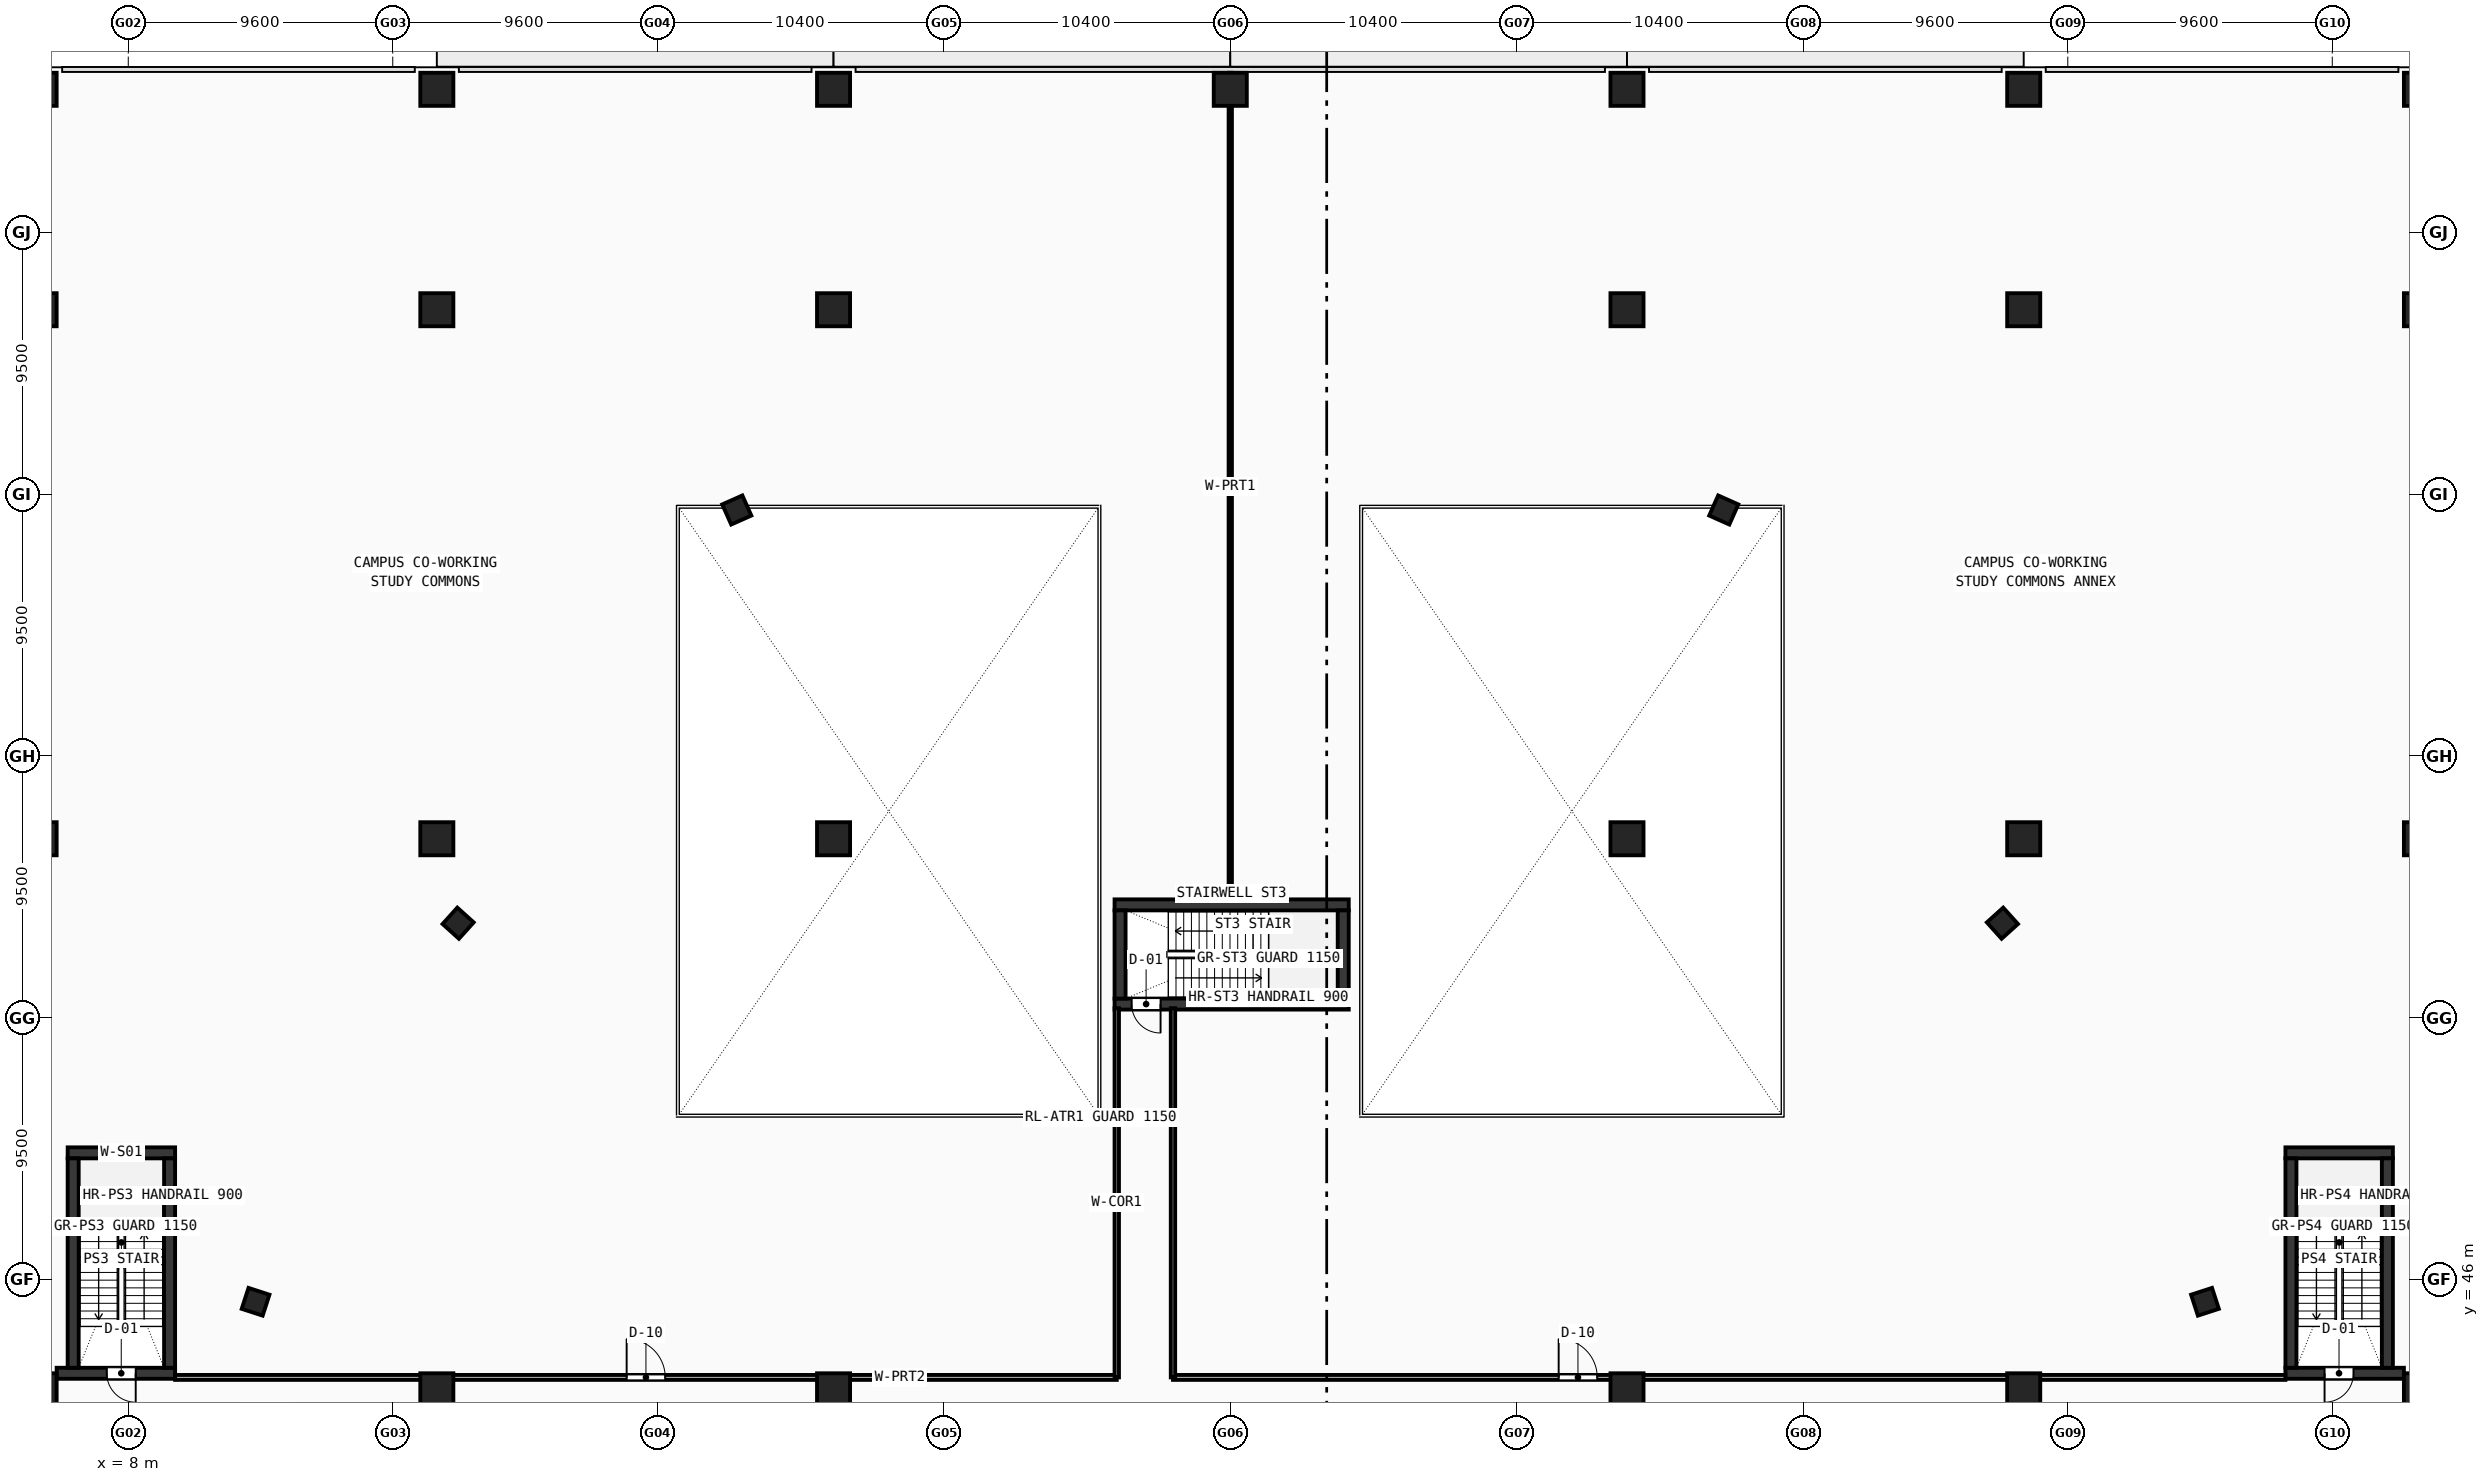
"""IFC4 building model, lengths in metres.
Left out: names, types, materials, properties, quantities, classifications, styles, units other than length and angle.
Written with IfcOpenShell. Run it as: python <this file> out.ifc"""

import sys

from ifc_helpers import new_model, si_unit, direction, frame, frame_2d, origin, origin_with_axes, origin_2d, place, context, subcontext, project, spatial, rectangle, hollow_rectangle, extrude, source, transform, mapped, element, fill, save


model = new_model("IFC4")
c1 = context("Model", 3, precision=1e-05, world=origin(), true_north=direction((0.0, 1.0)))
c2 = subcontext(c1, "Body", "Model", "MODEL_VIEW")
j1 = project(units=[si_unit("LENGTHUNIT", "METRE"), si_unit("PLANEANGLEUNIT", "RADIAN")], contexts=[c1])
p1 = place(None, origin())
s1 = spatial("IfcSite", under=j1, at=p1, CompositionType="ELEMENT")
p2 = place(p1, origin())
s2 = spatial("IfcBuilding", under=s1, at=p2, CompositionType="ELEMENT")
p3 = place(p2, frame((0.0, 0.0, 4.8)))
s3 = spatial("IfcBuildingStorey", under=s2, at=p3, CompositionType="ELEMENT", Elevation=4.8)
p4 = place(p3, frame((5.8, 50.6, 0.0), z_axis=(0.0, 0.0, 1.0), x_axis=(1.0, 0.0, 0.0)))
e1 = element("IfcWall", 1, at=p4, inside=s3, PredefinedType="SHEAR", context=c2, shape_type="SweptSolid", body=[
    extrude(rectangle(XDim=3.9, YDim=0.4, at=frame_2d((1.95, 0.0))), origin(), (0.0, 0.0, 1.0), 4.52),
])
p5 = place(p3, frame((5.4, 42.6, 0.0), z_axis=(0.0, 0.0, 1.0), x_axis=(1.0, 0.0, 0.0)))
e2 = element("IfcWall", 2, at=p5, inside=s3, PredefinedType="SHEAR", context=c2, shape_type="SweptSolid", body=[
    extrude(rectangle(XDim=4.3, YDim=0.4, at=frame_2d((2.15, 0.0))), origin(), (0.0, 0.0, 1.0), 4.52),
])
p6 = place(p5, frame((1.82, 0.0, 0.0)))
e3 = element("IfcOpeningElement", 3, at=p6, cuts=e2, PredefinedType="OPENING", context=c2, shape_type="SweptSolid", body=[
    extrude(rectangle(XDim=1.05, YDim=2.1, at=frame_2d((0.525, 1.05))), frame((0.0, 0.21, 0.0), z_axis=(0.0, -1.0, 0.0), x_axis=(1.0, 0.0, 0.0)), (0.0, 0.0, 1.0), 0.42),
])
for number, where, z_axis, x_axis in (
    (4, (6.0, 42.8, 0.0), (0.0, 0.0, 1.0), (0.0, 1.0, 0.0)),
    (5, (9.5, 42.8, 0.0), (0.0, 0.0, 1.0), (0.0, 1.0, 0.0)),
):
    element("IfcWall", number, at=place(p3, frame(where, z_axis=z_axis, x_axis=x_axis)), inside=s3, PredefinedType="SHEAR", context=c2, shape_type="SweptSolid", body=[
        extrude(rectangle(XDim=7.6, YDim=0.4, at=frame_2d((3.8, 0.0))), origin(), (0.0, 0.0, 1.0), 4.52),
    ])
p7 = place(p3, frame((86.3, 50.6, 0.0), z_axis=(0.0, 0.0, 1.0), x_axis=(1.0, 0.0, 0.0)))
e6 = element("IfcWall", 6, at=p7, inside=s3, PredefinedType="SHEAR", context=c2, shape_type="SweptSolid", body=[
    extrude(rectangle(XDim=3.9, YDim=0.4, at=frame_2d((1.95, 0.0))), origin(), (0.0, 0.0, 1.0), 4.52),
])
p8 = place(p3, frame((86.3, 42.6, 0.0), z_axis=(0.0, 0.0, 1.0), x_axis=(1.0, 0.0, 0.0)))
e7 = element("IfcWall", 7, at=p8, inside=s3, PredefinedType="SHEAR", context=c2, shape_type="SweptSolid", body=[
    extrude(rectangle(XDim=4.3, YDim=0.4, at=frame_2d((2.15, 0.0))), origin(), (0.0, 0.0, 1.0), 4.52),
])
p9 = place(p8, frame((1.42, 0.0, 0.0)))
e8 = element("IfcOpeningElement", 8, at=p9, cuts=e7, PredefinedType="OPENING", context=c2, shape_type="SweptSolid", body=[
    extrude(rectangle(XDim=1.05, YDim=2.1, at=frame_2d((0.525, 1.05))), frame((0.0, 0.21, 0.0), z_axis=(0.0, -1.0, 0.0), x_axis=(1.0, 0.0, 0.0)), (0.0, 0.0, 1.0), 0.42),
])
for number, where, z_axis, x_axis in (
    (9, (86.5, 42.8, 0.0), (0.0, 0.0, 1.0), (0.0, 1.0, 0.0)),
    (10, (90.0, 42.8, 0.0), (0.0, 0.0, 1.0), (0.0, 1.0, 0.0)),
):
    element("IfcWall", number, at=place(p3, frame(where, z_axis=z_axis, x_axis=x_axis)), inside=s3, PredefinedType="SHEAR", context=c2, shape_type="SweptSolid", body=[
        extrude(rectangle(XDim=7.6, YDim=0.4, at=frame_2d((3.8, 0.0))), origin(), (0.0, 0.0, 1.0), 4.52),
    ])
p10 = place(p3, frame((43.8, 59.6, 0.0), z_axis=(0.0, 0.0, 1.0), x_axis=(1.0, 0.0, 0.0)))
e11 = element("IfcWall", 11, at=p10, inside=s3, PredefinedType="SHEAR", context=c2, shape_type="SweptSolid", body=[
    extrude(rectangle(XDim=8.5, YDim=0.4, at=frame_2d((4.25, 0.0))), origin(), (0.0, 0.0, 1.0), 4.52),
])
p11 = place(p3, frame((43.8, 56.0, 0.0), z_axis=(0.0, 0.0, 1.0), x_axis=(1.0, 0.0, 0.0)))
e12 = element("IfcWall", 12, at=p11, inside=s3, PredefinedType="SHEAR", context=c2, shape_type="SweptSolid", body=[
    extrude(rectangle(XDim=8.5, YDim=0.4, at=frame_2d((4.25, 0.0))), origin(), (0.0, 0.0, 1.0), 4.52),
])
p12 = place(p11, frame((0.62, 0.0, 0.0)))
e13 = element("IfcOpeningElement", 13, at=p12, cuts=e12, PredefinedType="OPENING", context=c2, shape_type="SweptSolid", body=[
    extrude(rectangle(XDim=1.05, YDim=2.1, at=frame_2d((0.525, 1.05))), frame((0.0, 0.21, 0.0), z_axis=(0.0, -1.0, 0.0), x_axis=(1.0, 0.0, 0.0)), (0.0, 0.0, 1.0), 0.42),
])
for number, where, z_axis, x_axis in (
    (14, (44.0, 56.2, 0.0), (0.0, 0.0, 1.0), (0.0, 1.0, 0.0)),
    (15, (52.1, 56.2, 0.0), (0.0, 0.0, 1.0), (0.0, 1.0, 0.0)),
):
    element("IfcWall", number, at=place(p3, frame(where, z_axis=z_axis, x_axis=x_axis)), inside=s3, PredefinedType="SHEAR", context=c2, shape_type="SweptSolid", body=[
        extrude(rectangle(XDim=3.2, YDim=0.4, at=frame_2d((1.6, 0.0))), origin(), (0.0, 0.0, 1.0), 4.52),
    ])
m1 = source(origin(), c2, "Body", "SweptSolid", [
    extrude(hollow_rectangle(XDim=1.2, YDim=1.2, WallThickness=0.05, at=origin_2d()), origin(), (0.0, 0.0, 1.0), 4.8),
])
for number, where, z_axis, x_axis in (
    (16, (4.8, 42.0, -0.28), (0.0, 0.0, 1.0), (1.0, 0.0, 0.0)),
    (17, (4.8, 62.0, -0.28), (0.0, 0.0, 1.0), (1.0, 0.0, 0.0)),
    (18, (4.8, 81.2, -0.28), (0.0, 0.0, 1.0), (1.0, 0.0, 0.0)),
    (19, (19.2, 42.0, -0.28), (0.0, 0.0, 1.0), (1.0, 0.0, 0.0)),
    (20, (19.2, 62.0, -0.28), (0.0, 0.0, 1.0), (1.0, 0.0, 0.0)),
    (21, (19.2, 81.2, -0.28), (0.0, 0.0, 1.0), (1.0, 0.0, 0.0)),
    (22, (33.6, 42.0, -0.28), (0.0, 0.0, 1.0), (1.0, 0.0, 0.0)),
    (23, (33.6, 62.0, -0.28), (0.0, 0.0, 1.0), (1.0, 0.0, 0.0)),
    (24, (33.6, 81.2, -0.28), (0.0, 0.0, 1.0), (1.0, 0.0, 0.0)),
    (25, (62.4, 42.0, -0.28), (0.0, 0.0, 1.0), (1.0, 0.0, 0.0)),
    (26, (62.4, 62.0, -0.28), (0.0, 0.0, 1.0), (1.0, 0.0, 0.0)),
    (27, (62.4, 81.2, -0.28), (0.0, 0.0, 1.0), (1.0, 0.0, 0.0)),
    (28, (76.8, 42.0, -0.28), (0.0, 0.0, 1.0), (1.0, 0.0, 0.0)),
    (29, (76.8, 62.0, -0.28), (0.0, 0.0, 1.0), (1.0, 0.0, 0.0)),
    (30, (76.8, 81.2, -0.28), (0.0, 0.0, 1.0), (1.0, 0.0, 0.0)),
    (31, (91.2, 42.0, -0.28), (0.0, 0.0, 1.0), (1.0, 0.0, 0.0)),
    (32, (91.2, 62.0, -0.28), (0.0, 0.0, 1.0), (1.0, 0.0, 0.0)),
    (33, (91.2, 81.2, -0.28), (0.0, 0.0, 1.0), (1.0, 0.0, 0.0)),
):
    element("IfcColumn", number, at=place(p3, frame(where, z_axis=z_axis, x_axis=x_axis)), inside=s3, PredefinedType="COLUMN", context=c2, shape_type="MappedRepresentation", body=[
        mapped(m1, transform((0.0, 0.0, 0.0), scale=1.0)),
    ])
m2 = source(origin(), c2, "Body", "SweptSolid", [
    extrude(hollow_rectangle(XDim=0.8, YDim=0.8, WallThickness=0.032, at=origin_2d()), origin(), (0.0, 0.0, 1.0), 4.8),
])
for number, where, z_axis, x_axis in (
    (34, (83.379, 45.196, -0.28), (0.0, 0.0, 1.0), (-0.309, 0.951, 0.0)),
    (35, (76.027, 58.935, -0.28), (0.0, 0.0, 1.0), (-0.669, 0.743, 0.0)),
    (36, (65.913, 73.932, -0.28), (0.0, 0.0, 1.0), (-0.914, 0.407, 0.0)),
    (37, (30.088, 73.932, -0.28), (0.0, 0.0, 1.0), (-0.914, -0.407, 0.0)),
    (38, (19.973, 58.935, -0.28), (0.0, 0.0, 1.0), (-0.669, -0.743, 0.0)),
    (39, (12.621, 45.196, -0.28), (0.0, 0.0, 1.0), (-0.309, -0.951, 0.0)),
):
    element("IfcColumn", number, at=place(p3, frame(where, z_axis=z_axis, x_axis=x_axis)), inside=s3, PredefinedType="COLUMN", context=c2, shape_type="MappedRepresentation", body=[
        mapped(m2, transform((0.0, 0.0, 0.0), scale=1.0)),
    ])
for number, where, z_axis, x_axis in (
    (40, (4.8, 89.2, -0.28), (0.0, 0.0, 1.0), (1.0, 0.0, 0.0)),
    (41, (19.2, 89.2, -0.28), (0.0, 0.0, 1.0), (1.0, 0.0, 0.0)),
    (42, (33.6, 89.2, -0.28), (0.0, 0.0, 1.0), (1.0, 0.0, 0.0)),
    (43, (48.0, 89.2, -0.28), (0.0, 0.0, 1.0), (1.0, 0.0, 0.0)),
    (44, (62.4, 89.2, -0.28), (0.0, 0.0, 1.0), (1.0, 0.0, 0.0)),
    (45, (76.8, 89.2, -0.28), (0.0, 0.0, 1.0), (1.0, 0.0, 0.0)),
    (46, (91.2, 89.2, -0.28), (0.0, 0.0, 1.0), (1.0, 0.0, 0.0)),
):
    element("IfcColumn", number, at=place(p3, frame(where, z_axis=z_axis, x_axis=x_axis)), inside=s3, PredefinedType="COLUMN", context=c2, shape_type="MappedRepresentation", body=[
        mapped(m1, transform((0.0, 0.0, 0.0), scale=1.0)),
    ])
p13 = place(p3, frame((9.7, 42.45, 0.0), z_axis=(0.0, 0.0, 1.0), x_axis=(1.0, 0.0, 0.0)))
e47 = element("IfcWall", 47, at=p13, inside=s3, PredefinedType="PARTITIONING", context=c2, shape_type="SweptSolid", body=[
    extrude(rectangle(XDim=34.18, YDim=0.18, at=frame_2d((17.09, 0.0))), origin(), (0.0, 0.0, 1.0), 3.62),
])
p14 = place(p13, frame((16.39, 0.0, 0.0)))
e48 = element("IfcOpeningElement", 48, at=p14, cuts=e47, PredefinedType="OPENING", context=c2, shape_type="SweptSolid", body=[
    extrude(rectangle(XDim=1.4, YDim=2.15, at=frame_2d((0.7, 1.075))), frame((0.0, 0.1, 0.0), z_axis=(0.0, -1.0, 0.0), x_axis=(1.0, 0.0, 0.0)), (0.0, 0.0, 1.0), 0.2),
])
p15 = place(p3, frame((45.92, 42.45, 0.0), z_axis=(0.0, 0.0, 1.0), x_axis=(1.0, 0.0, 0.0)))
e49 = element("IfcWall", 49, at=p15, inside=s3, PredefinedType="PARTITIONING", context=c2, shape_type="SweptSolid", body=[
    extrude(rectangle(XDim=40.38, YDim=0.18, at=frame_2d((20.19, 0.0))), origin(), (0.0, 0.0, 1.0), 3.62),
])
p16 = place(p15, frame((14.0, 0.0, 0.0)))
e50 = element("IfcOpeningElement", 50, at=p16, cuts=e49, PredefinedType="OPENING", context=c2, shape_type="SweptSolid", body=[
    extrude(rectangle(XDim=1.4, YDim=2.15, at=frame_2d((0.7, 1.075))), frame((0.0, 0.1, 0.0), z_axis=(0.0, -1.0, 0.0), x_axis=(1.0, 0.0, 0.0)), (0.0, 0.0, 1.0), 0.2),
])
for number, where, z_axis, x_axis in (
    (51, (43.88, 42.45, 0.0), (0.0, 0.0, 1.0), (0.0, 1.0, 0.0)),
    (52, (45.92, 42.45, 0.0), (0.0, 0.0, 1.0), (0.0, 1.0, 0.0)),
):
    element("IfcWall", number, at=place(p3, frame(where, z_axis=z_axis, x_axis=x_axis)), inside=s3, PredefinedType="PARTITIONING", context=c2, shape_type="SweptSolid", body=[
        extrude(rectangle(XDim=13.4, YDim=0.16, at=frame_2d((6.7, 0.0))), origin(), (0.0, 0.0, 1.0), 4.12),
    ])
p17 = place(p3, frame((48.0, 59.8, 0.0), z_axis=(0.0, 0.0, 1.0), x_axis=(0.0, 1.0, 0.0)))
e53 = element("IfcWall", 53, at=p17, inside=s3, PredefinedType="PARTITIONING", context=c2, shape_type="SweptSolid", body=[
    extrude(rectangle(XDim=30.0, YDim=0.12, at=frame_2d((15.0, 0.0))), origin(), (0.0, 0.0, 1.0), 3.62),
])
m3 = source(origin(), c2, "Body", "SweptSolid", [
    extrude(rectangle(XDim=1.05, YDim=2.1, at=frame_2d((0.525, 1.05))), frame((0.0, 0.025, 0.0), z_axis=(0.0, -1.0, 0.0), x_axis=(1.0, 0.0, 0.0)), (0.0, 0.0, 1.0), 0.05),
])
p18 = place(p6, frame((1.05, 0.0, 0.0), z_axis=(0.0, 0.0, 1.0), x_axis=(-1.0, 0.0, 0.0)))
e54 = element("IfcDoor", 54, at=p18, inside=s3, OperationType="SINGLE_SWING_LEFT", PredefinedType="DOOR", context=c2, shape_type="MappedRepresentation", body=[
    mapped(m3, transform((0.0, 0.0, 0.0), scale=1.0)),
])
fill(e3, e54)
p19 = place(p9, frame((1.05, 0.0, 0.0), z_axis=(0.0, 0.0, 1.0), x_axis=(-1.0, 0.0, 0.0)))
e55 = element("IfcDoor", 55, at=p19, inside=s3, OperationType="SINGLE_SWING_RIGHT", PredefinedType="DOOR", context=c2, shape_type="MappedRepresentation", body=[
    mapped(m3, transform((0.0, 0.0, 0.0), scale=1.0)),
])
fill(e8, e55)
p20 = place(p12, frame((1.05, 0.0, 0.0), z_axis=(0.0, 0.0, 1.0), x_axis=(-1.0, 0.0, 0.0)))
e56 = element("IfcDoor", 56, at=p20, inside=s3, OperationType="SINGLE_SWING_LEFT", PredefinedType="DOOR", context=c2, shape_type="MappedRepresentation", body=[
    mapped(m3, transform((0.0, 0.0, 0.0), scale=1.0)),
])
fill(e13, e56)
m4 = source(origin(), c2, "Body", "SweptSolid", [
    extrude(rectangle(XDim=1.4, YDim=2.15, at=frame_2d((0.7, 1.075))), frame((0.0, 0.025, 0.0), z_axis=(0.0, -1.0, 0.0), x_axis=(1.0, 0.0, 0.0)), (0.0, 0.0, 1.0), 0.05),
])
p21 = place(p14, origin_with_axes())
e57 = element("IfcDoor", 57, at=p21, inside=s3, OperationType="SINGLE_SWING_LEFT", PredefinedType="DOOR", context=c2, shape_type="MappedRepresentation", body=[
    mapped(m4, transform((0.0, 0.0, 0.0), scale=1.0)),
])
fill(e48, e57)
p22 = place(p16, origin_with_axes())
e58 = element("IfcDoor", 58, at=p22, inside=s3, OperationType="SINGLE_SWING_LEFT", PredefinedType="DOOR", context=c2, shape_type="MappedRepresentation", body=[
    mapped(m4, transform((0.0, 0.0, 0.0), scale=1.0)),
])
fill(e50, e58)
save(model, sys.argv[1])
